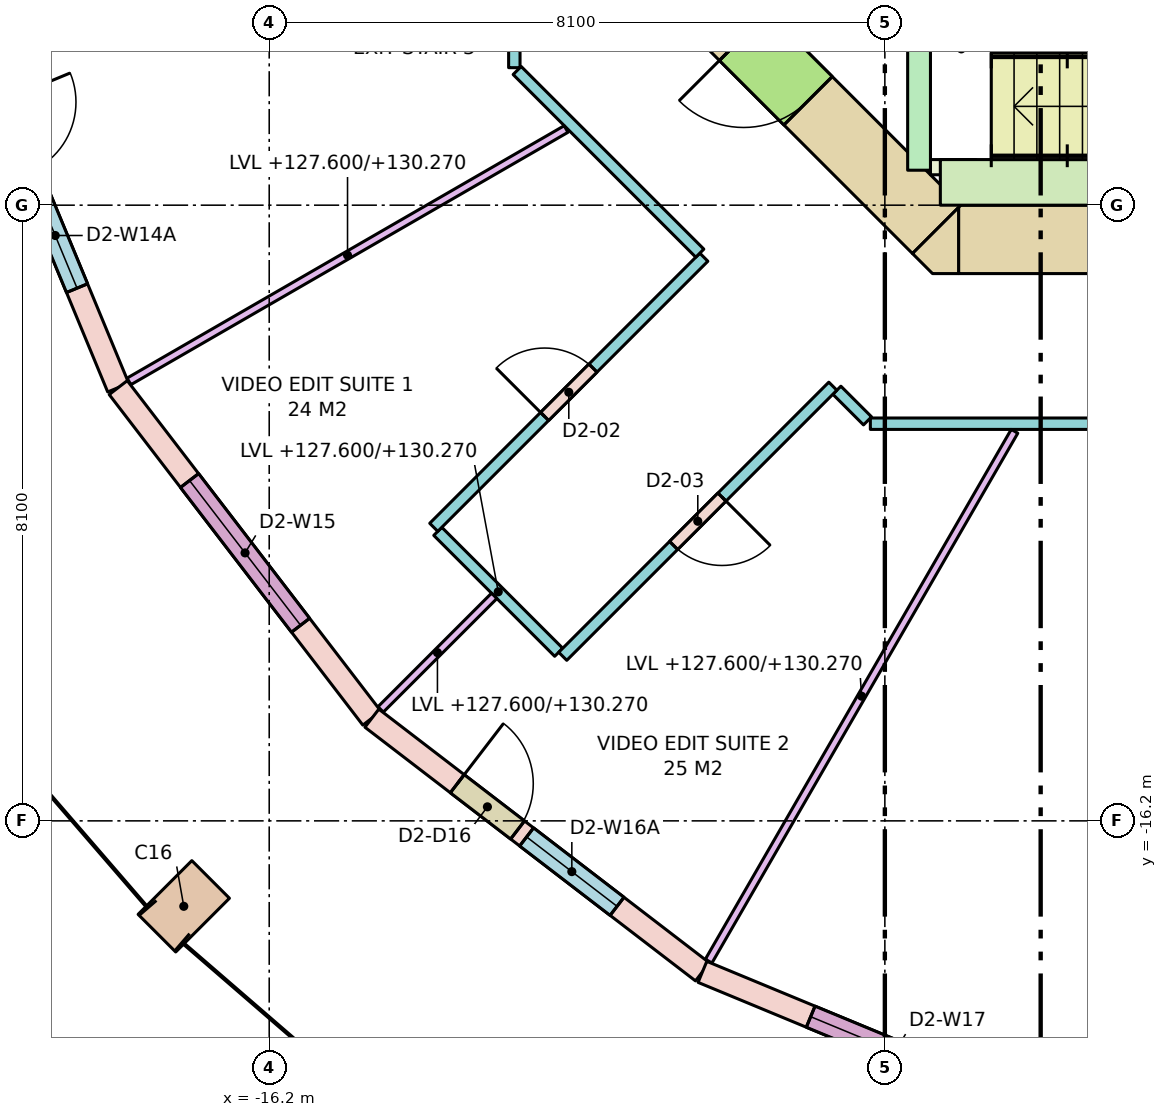
"""IFC4 building model, lengths in metres.
Left out: names, types, materials, properties, quantities, classifications, styles, units other than length and angle.
Written with IfcOpenShell. Run it as: python <this file> out.ifc"""

import sys

from ifc_helpers import new_model, si_unit, direction, frame, frame_2d, origin, origin_2d, place, context, subcontext, project, spatial, polyline, rectangle, outline, extrude, element, fill, save


model = new_model("IFC4")
c1 = context("Model", 3, precision=1e-05, world=origin(), true_north=direction((0.0, 1.0)))
c2 = subcontext(c1, "Body", "Model", "MODEL_VIEW")
j1 = project(units=[si_unit("LENGTHUNIT", "METRE"), si_unit("PLANEANGLEUNIT", "RADIAN")], contexts=[c1])
p1 = place(None, origin())
s1 = spatial("IfcSite", under=j1, at=p1, CompositionType="ELEMENT")
p2 = place(p1, origin())
s2 = spatial("IfcBuilding", under=s1, at=p2, CompositionType="ELEMENT")
p3 = place(p2, frame((0.0, 0.0, 127.6)))
s3 = spatial("IfcBuildingStorey", under=s2, at=p3, CompositionType="ELEMENT", Elevation=127.6)
p4 = place(p3, frame((-17.324, -17.324, 0.0), z_axis=(0.0, 0.0, 1.0), x_axis=(0.707106781187, -0.707106781187, 0.0)))
e1 = element("IfcColumn", 1, at=p4, inside=s3, PredefinedType="COLUMN", context=c2, shape_type="SweptSolid", body=[
    extrude(rectangle(XDim=0.7, YDim=1.0, at=origin_2d()), origin(), (0.0, 0.0, 1.0), 3.8),
])
p5 = place(p3, frame((-7.13, -8.55, -0.28), z_axis=(0.0, 0.0, 1.0), x_axis=(1.0, 0.0, 0.0)))
e2 = element("IfcWall", 2, at=p5, inside=s3, PredefinedType="SHEAR", context=c2, shape_type="SweptSolid", body=[
    extrude(rectangle(XDim=14.26, YDim=0.9, at=frame_2d((7.13, 0.0))), origin(), (0.0, 0.0, 1.0), 3.8),
])
p6 = place(p5, frame((8.08, 0.0, 0.28)))
e3 = element("IfcOpeningElement", 3, at=p6, cuts=e2, PredefinedType="OPENING", context=c2, shape_type="SweptSolid", body=[
    extrude(rectangle(XDim=0.7, YDim=2.1, at=frame_2d((0.35, 1.05))), frame((0.0, 0.46, 0.0), z_axis=(0.0, -1.0, 0.0), x_axis=(1.0, 0.0, 0.0)), (0.0, 0.0, 1.0), 0.92),
])
p7 = place(p5, frame((6.205, 0.0, 0.28)))
e4 = element("IfcOpeningElement", 4, at=p7, cuts=e2, PredefinedType="OPENING", context=c2, shape_type="SweptSolid", body=[
    extrude(rectangle(XDim=0.9, YDim=2.1, at=frame_2d((0.45, 1.05))), frame((0.0, 0.46, 0.0), z_axis=(0.0, -1.0, 0.0), x_axis=(1.0, 0.0, 0.0)), (0.0, 0.0, 1.0), 0.92),
])
p8 = place(p5, frame((10.667, 0.0, 0.28)))
e5 = element("IfcOpeningElement", 5, at=p8, cuts=e2, PredefinedType="OPENING", context=c2, shape_type="SweptSolid", body=[
    extrude(rectangle(XDim=0.9, YDim=2.1, at=frame_2d((0.45, 1.05))), frame((0.0, 0.46, 0.0), z_axis=(0.0, -1.0, 0.0), x_axis=(1.0, 0.0, 0.0)), (0.0, 0.0, 1.0), 0.92),
])
p9 = place(p3, frame((-7.418, -8.418, -0.28), z_axis=(0.0, 0.0, 1.0), x_axis=(-0.707106781187, 0.707106781187, 0.0)))
e6 = element("IfcWall", 6, at=p9, inside=s3, PredefinedType="SHEAR", context=c2, shape_type="SweptSolid", body=[
    extrude(rectangle(XDim=4.243, YDim=0.9, at=frame_2d((2.121, 0.0))), origin(), (0.0, 0.0, 1.0), 3.8),
])
p10 = place(p9, frame((2.393, 0.0, 0.28)))
e7 = element("IfcOpeningElement", 7, at=p10, cuts=e6, PredefinedType="OPENING", context=c2, shape_type="SweptSolid", body=[
    extrude(rectangle(XDim=1.2, YDim=2.1, at=frame_2d((0.6, 1.05))), frame((0.0, 0.46, 0.0), z_axis=(0.0, -1.0, 0.0), x_axis=(1.0, 0.0, 0.0)), (0.0, 0.0, 1.0), 0.92),
])
p11 = place(p3, frame((0.0, 0.0, -0.28)))
e8 = element("IfcWall", 8, at=p11, inside=s3, PredefinedType="SHEAR", context=c2, shape_type="SweptSolid", body=[
    extrude(outline(polyline([(-7.473, -9.0), (-7.736, -8.736), (-7.13, -8.13), (-7.13, -9.0), (-7.473, -9.0)])), origin(), (0.0, 0.0, 1.0), 3.8),
])
p12 = place(p3, frame((-7.65, -7.64, 0.0), z_axis=(0.0, 0.0, 1.0), x_axis=(0.0, 1.0, 0.0)))
e9 = element("IfcWall", 9, at=p12, inside=s3, PredefinedType="SHEAR", context=c2, shape_type="SweptSolid", body=[
    extrude(rectangle(XDim=3.14, YDim=0.3, at=frame_2d((1.57, 0.0))), origin(), (0.0, 0.0, 1.0), 3.52),
])
p13 = place(p12, frame((1.68, 0.0, 0.0)))
e10 = element("IfcOpeningElement", 10, at=p13, cuts=e9, PredefinedType="OPENING", context=c2, shape_type="SweptSolid", body=[
    extrude(rectangle(XDim=1.32, YDim=2.1, at=frame_2d((0.66, 1.05))), frame((0.0, 0.16, 0.0), z_axis=(0.0, -1.0, 0.0), x_axis=(1.0, 0.0, 0.0)), (0.0, 0.0, 1.0), 0.32),
])
p14 = place(p3, frame((-7.5, -7.6, 0.0), z_axis=(0.0, 0.0, 1.0), x_axis=(1.0, 0.0, 0.0)))
e11 = element("IfcWall", 11, at=p14, inside=s3, PredefinedType="SHEAR", context=c2, shape_type="SweptSolid", body=[
    extrude(rectangle(XDim=0.6, YDim=0.2, at=frame_2d((0.3, 0.0))), origin(), (0.0, 0.0, 1.0), 3.52),
])
p15 = place(p3, frame((-7.37, -7.8, 0.0), z_axis=(0.0, 0.0, 1.0), x_axis=(1.0, 0.0, 0.0)))
e12 = element("IfcWall", 12, at=p15, inside=s3, PredefinedType="SHEAR", context=c2, shape_type="SweptSolid", body=[
    extrude(rectangle(XDim=5.37, YDim=0.6, at=frame_2d((2.685, 0.0))), origin(), (0.0, 0.0, 1.0), 3.52),
])
p16 = place(p3, frame((-20.284, -5.435, 0.0), z_axis=(0.0, 0.0, 1.0), x_axis=(0.382688740813, -0.923877333662, 0.0)))
e13 = element("IfcWall", 13, at=p16, inside=s3, PredefinedType="STANDARD", context=c2, shape_type="SweptSolid", body=[
    extrude(rectangle(XDim=5.482, YDim=0.3, at=frame_2d((2.741, 0.0))), origin(), (0.0, 0.0, 1.0), 3.52),
])
p17 = place(p16, frame((1.416, 0.0, 0.0)))
e14 = element("IfcOpeningElement", 14, at=p17, cuts=e13, PredefinedType="OPENING", context=c2, shape_type="SweptSolid", body=[
    extrude(rectangle(XDim=1.0, YDim=2.4, at=frame_2d((0.5, 1.2))), frame((0.0, 0.16, 0.0), z_axis=(0.0, -1.0, 0.0), x_axis=(1.0, 0.0, 0.0)), (0.0, 0.0, 1.0), 0.32),
])
p18 = place(p16, frame((2.566, 0.0, 0.8)))
e15 = element("IfcOpeningElement", 15, at=p18, cuts=e13, PredefinedType="OPENING", context=c2, shape_type="SweptSolid", body=[
    extrude(rectangle(XDim=1.5, YDim=2.5, at=frame_2d((0.75, 1.25))), frame((0.0, 0.16, 0.0), z_axis=(0.0, -1.0, 0.0), x_axis=(1.0, 0.0, 0.0)), (0.0, 0.0, 1.0), 0.32),
])
p19 = place(p3, frame((-18.187, -10.5, 0.0), z_axis=(0.0, 0.0, 1.0), x_axis=(0.608784891166, -0.793335336593, 0.0)))
e16 = element("IfcWall", 16, at=p19, inside=s3, PredefinedType="STANDARD", context=c2, shape_type="SweptSolid", body=[
    extrude(rectangle(XDim=5.482, YDim=0.3, at=frame_2d((2.741, 0.0))), origin(), (0.0, 0.0, 1.0), 3.52),
])
p20 = place(p19, frame((1.541, 0.0, 0.8)))
e17 = element("IfcOpeningElement", 17, at=p20, cuts=e16, PredefinedType="OPENING", context=c2, shape_type="SweptSolid", body=[
    extrude(rectangle(XDim=2.4, YDim=2.5, at=frame_2d((1.2, 1.25))), frame((0.0, 0.16, 0.0), z_axis=(0.0, -1.0, 0.0), x_axis=(1.0, 0.0, 0.0)), (0.0, 0.0, 1.0), 0.32),
])
p21 = place(p3, frame((-14.849, -14.849, 0.0), z_axis=(0.0, 0.0, 1.0), x_axis=(0.793335336593, -0.608784891166, 0.0)))
e18 = element("IfcWall", 18, at=p21, inside=s3, PredefinedType="STANDARD", context=c2, shape_type="SweptSolid", body=[
    extrude(rectangle(XDim=5.482, YDim=0.3, at=frame_2d((2.741, 0.0))), origin(), (0.0, 0.0, 1.0), 3.52),
])
p22 = place(p21, frame((1.416, 0.0, 0.0)))
e19 = element("IfcOpeningElement", 19, at=p22, cuts=e18, PredefinedType="OPENING", context=c2, shape_type="SweptSolid", body=[
    extrude(rectangle(XDim=1.0, YDim=2.4, at=frame_2d((0.5, 1.2))), frame((0.0, 0.16, 0.0), z_axis=(0.0, -1.0, 0.0), x_axis=(1.0, 0.0, 0.0)), (0.0, 0.0, 1.0), 0.32),
])
p23 = place(p21, frame((2.566, 0.0, 0.8)))
e20 = element("IfcOpeningElement", 20, at=p23, cuts=e18, PredefinedType="OPENING", context=c2, shape_type="SweptSolid", body=[
    extrude(rectangle(XDim=1.5, YDim=2.5, at=frame_2d((0.75, 1.25))), frame((0.0, 0.16, 0.0), z_axis=(0.0, -1.0, 0.0), x_axis=(1.0, 0.0, 0.0)), (0.0, 0.0, 1.0), 0.32),
])
p24 = place(p3, frame((-10.5, -18.187, 0.0), z_axis=(0.0, 0.0, 1.0), x_axis=(0.923877333662, -0.382688740813, 0.0)))
e21 = element("IfcWall", 21, at=p24, inside=s3, PredefinedType="STANDARD", context=c2, shape_type="SweptSolid", body=[
    extrude(rectangle(XDim=5.482, YDim=0.3, at=frame_2d((2.741, 0.0))), origin(), (0.0, 0.0, 1.0), 3.52),
])
p25 = place(p24, frame((1.541, 0.0, 0.8)))
e22 = element("IfcOpeningElement", 22, at=p25, cuts=e21, PredefinedType="OPENING", context=c2, shape_type="SweptSolid", body=[
    extrude(rectangle(XDim=2.4, YDim=2.5, at=frame_2d((1.2, 1.25))), frame((0.0, 0.16, 0.0), z_axis=(0.0, -1.0, 0.0), x_axis=(1.0, 0.0, 0.0)), (0.0, 0.0, 1.0), 0.32),
])
p26 = place(p3, frame((-12.391, -13.982, 0.0), z_axis=(0.0, 0.0, 1.0), x_axis=(-0.707106781187, 0.707106781187, 0.0)))
e23 = element("IfcWall", 23, at=p26, inside=s3, PredefinedType="PARTITIONING", context=c2, shape_type="SweptSolid", body=[
    extrude(rectangle(XDim=2.25, YDim=0.15, at=frame_2d((1.125, 0.0))), origin(), (0.0, 0.0, 1.0), 2.67),
])
p27 = place(p3, frame((-14.035, -12.338, 0.0), z_axis=(0.0, 0.0, 1.0), x_axis=(0.707106781187, 0.707106781187, 0.0)))
e24 = element("IfcWall", 24, at=p27, inside=s3, PredefinedType="PARTITIONING", context=c2, shape_type="SweptSolid", body=[
    extrude(rectangle(XDim=5.026, YDim=0.15, at=frame_2d((2.513, 0.0))), origin(), (0.0, 0.0, 1.0), 3.52),
])
p28 = place(p27, frame((2.063, 0.0, 0.0)))
e25 = element("IfcOpeningElement", 25, at=p28, cuts=e24, PredefinedType="OPENING", context=c2, shape_type="SweptSolid", body=[
    extrude(rectangle(XDim=0.9, YDim=2.1, at=frame_2d((0.45, 1.05))), frame((0.0, 0.085, 0.0), z_axis=(0.0, -1.0, 0.0), x_axis=(1.0, 0.0, 0.0)), (0.0, 0.0, 1.0), 0.17),
])
p29 = place(p3, frame((-10.534, -8.731, 0.0), z_axis=(0.0, 0.0, 1.0), x_axis=(-0.707106781187, 0.707106781187, 0.0)))
e26 = element("IfcWall", 26, at=p29, inside=s3, PredefinedType="PARTITIONING", context=c2, shape_type="SweptSolid", body=[
    extrude(rectangle(XDim=3.399, YDim=0.15, at=frame_2d((1.7, 0.0))), origin(), (0.0, 0.0, 1.0), 2.67),
])
p30 = place(p3, frame((-12.975, -6.291, 0.0), z_axis=(0.0, 0.0, 1.0), x_axis=(0.0, 1.0, 0.0)))
e27 = element("IfcWall", 27, at=p30, inside=s3, PredefinedType="PARTITIONING", context=c2, shape_type="SweptSolid", body=[
    extrude(rectangle(XDim=12.582, YDim=0.15, at=frame_2d((6.291, 0.0))), origin(), (0.0, 0.0, 1.0), 2.67),
])
p31 = place(p30, frame((5.391, 0.0, 0.0)))
e28 = element("IfcOpeningElement", 28, at=p31, cuts=e27, PredefinedType="OPENING", context=c2, shape_type="SweptSolid", body=[
    extrude(rectangle(XDim=1.8, YDim=2.1, at=frame_2d((0.9, 1.05))), frame((0.0, 0.085, 0.0), z_axis=(0.0, -1.0, 0.0), x_axis=(1.0, 0.0, 0.0)), (0.0, 0.0, 1.0), 0.17),
])
p32 = place(p3, frame((-1.275, -10.975, 0.0), z_axis=(0.0, 0.0, 1.0), x_axis=(-1.0, 0.0, 0.0)))
e29 = element("IfcWall", 29, at=p32, inside=s3, PredefinedType="PARTITIONING", context=c2, shape_type="SweptSolid", body=[
    extrude(rectangle(XDim=7.016, YDim=0.15, at=frame_2d((3.508, 0.0))), origin(), (0.0, 0.0, 1.0), 2.67),
])
p33 = place(p3, frame((-8.328, -10.938, 0.0), z_axis=(0.0, 0.0, 1.0), x_axis=(-0.707106781187, 0.707106781187, 0.0)))
e30 = element("IfcWall", 30, at=p33, inside=s3, PredefinedType="PARTITIONING", context=c2, shape_type="SweptSolid", body=[
    extrude(rectangle(XDim=0.571, YDim=0.15, at=frame_2d((0.285, 0.0))), origin(), (0.0, 0.0, 1.0), 3.52),
])
p34 = place(p3, frame((-8.784, -10.481, 0.0), z_axis=(0.0, 0.0, 1.0), x_axis=(-0.707106781187, -0.707106781187, 0.0)))
e31 = element("IfcWall", 31, at=p34, inside=s3, PredefinedType="PARTITIONING", context=c2, shape_type="SweptSolid", body=[
    extrude(rectangle(XDim=5.026, YDim=0.15, at=frame_2d((2.513, 0.0))), origin(), (0.0, 0.0, 1.0), 3.52),
])
p35 = place(p34, frame((2.063, 0.0, 0.0)))
e32 = element("IfcOpeningElement", 32, at=p35, cuts=e31, PredefinedType="OPENING", context=c2, shape_type="SweptSolid", body=[
    extrude(rectangle(XDim=0.9, YDim=2.1, at=frame_2d((0.45, 1.05))), frame((0.0, 0.085, 0.0), z_axis=(0.0, -1.0, 0.0), x_axis=(1.0, 0.0, 0.0)), (0.0, 0.0, 1.0), 0.17),
])
p36 = place(p3, frame((-12.294, -7.098, 0.0), z_axis=(0.0, 0.0, 1.0), x_axis=(-0.866010486135, -0.500025837236, 0.0)))
e33 = element("IfcWall", 33, at=p36, inside=s3, PredefinedType="PARTITIONING", context=c2, shape_type="SweptSolid", body=[
    extrude(rectangle(XDim=6.641, YDim=0.1, at=frame_2d((3.32, 0.0))), origin(), (0.0, 0.0, 1.0), 2.67),
])
p37 = place(p3, frame((-13.24, -13.24, 0.0), z_axis=(0.0, 0.0, 1.0), x_axis=(-0.707106781187, -0.707106781187, 0.0)))
e34 = element("IfcWall", 34, at=p37, inside=s3, PredefinedType="PARTITIONING", context=c2, shape_type="SweptSolid", body=[
    extrude(rectangle(XDim=2.113, YDim=0.1, at=frame_2d((1.057, 0.0))), origin(), (0.0, 0.0, 1.0), 2.67),
])
p38 = place(p3, frame((-6.394, -11.075, 0.0), z_axis=(0.0, 0.0, 1.0), x_axis=(-0.500024397361, -0.866011317503, 0.0)))
e35 = element("IfcWall", 35, at=p38, inside=s3, PredefinedType="PARTITIONING", context=c2, shape_type="SweptSolid", body=[
    extrude(rectangle(XDim=8.049, YDim=0.1, at=frame_2d((4.024, 0.0))), origin(), (0.0, 0.0, 1.0), 2.67),
])
p39 = place(p18, origin())
e36 = element("IfcWindow", 36, at=p39, inside=s3, PartitioningType="SINGLE_PANEL", PredefinedType="WINDOW", context=c2, shape_type="SweptSolid", body=[
    extrude(rectangle(XDim=1.5, YDim=2.5, at=frame_2d((0.75, 1.25))), frame((0.0, 0.03, 0.0), z_axis=(0.0, -1.0, 0.0), x_axis=(1.0, 0.0, 0.0)), (0.0, 0.0, 1.0), 0.06),
])
fill(e15, e36)
p40 = place(p20, origin())
e37 = element("IfcWindow", 37, at=p40, inside=s3, PartitioningType="SINGLE_PANEL", PredefinedType="WINDOW", context=c2, shape_type="SweptSolid", body=[
    extrude(rectangle(XDim=2.4, YDim=2.5, at=frame_2d((1.2, 1.25))), frame((0.0, 0.03, 0.0), z_axis=(0.0, -1.0, 0.0), x_axis=(1.0, 0.0, 0.0)), (0.0, 0.0, 1.0), 0.06),
])
fill(e17, e37)
p41 = place(p22, origin())
e38 = element("IfcDoor", 38, at=p41, inside=s3, OperationType="SINGLE_SWING_LEFT", PredefinedType="DOOR", context=c2, shape_type="SweptSolid", body=[
    extrude(rectangle(XDim=1.0, YDim=2.4, at=frame_2d((0.5, 1.2))), frame((0.0, 0.025, 0.0), z_axis=(0.0, -1.0, 0.0), x_axis=(1.0, 0.0, 0.0)), (0.0, 0.0, 1.0), 0.05),
])
fill(e19, e38)
p42 = place(p23, origin())
e39 = element("IfcWindow", 39, at=p42, inside=s3, PartitioningType="SINGLE_PANEL", PredefinedType="WINDOW", context=c2, shape_type="SweptSolid", body=[
    extrude(rectangle(XDim=1.5, YDim=2.5, at=frame_2d((0.75, 1.25))), frame((0.0, 0.03, 0.0), z_axis=(0.0, -1.0, 0.0), x_axis=(1.0, 0.0, 0.0)), (0.0, 0.0, 1.0), 0.06),
])
fill(e20, e39)
p43 = place(p25, origin())
e40 = element("IfcWindow", 40, at=p43, inside=s3, PartitioningType="SINGLE_PANEL", PredefinedType="WINDOW", context=c2, shape_type="SweptSolid", body=[
    extrude(rectangle(XDim=2.4, YDim=2.5, at=frame_2d((1.2, 1.25))), frame((0.0, 0.03, 0.0), z_axis=(0.0, -1.0, 0.0), x_axis=(1.0, 0.0, 0.0)), (0.0, 0.0, 1.0), 0.06),
])
fill(e22, e40)
p44 = place(p10, origin())
e41 = element("IfcDoor", 41, at=p44, inside=s3, OperationType="SINGLE_SWING_RIGHT", PredefinedType="DOOR", context=c2, shape_type="SweptSolid", body=[
    extrude(rectangle(XDim=1.2, YDim=2.1, at=frame_2d((0.6, 1.05))), frame((0.0, 0.025, 0.0), z_axis=(0.0, -1.0, 0.0), x_axis=(1.0, 0.0, 0.0)), (0.0, 0.0, 1.0), 0.05),
])
fill(e7, e41)
p45 = place(p28, origin())
e42 = element("IfcDoor", 42, at=p45, inside=s3, OperationType="SINGLE_SWING_LEFT", PredefinedType="DOOR", context=c2, shape_type="SweptSolid", body=[
    extrude(rectangle(XDim=0.9, YDim=2.1, at=frame_2d((0.45, 1.05))), frame((0.0, 0.025, 0.0), z_axis=(0.0, -1.0, 0.0), x_axis=(1.0, 0.0, 0.0)), (0.0, 0.0, 1.0), 0.05),
])
fill(e25, e42)
p46 = place(p35, origin())
e43 = element("IfcDoor", 43, at=p46, inside=s3, OperationType="SINGLE_SWING_LEFT", PredefinedType="DOOR", context=c2, shape_type="SweptSolid", body=[
    extrude(rectangle(XDim=0.9, YDim=2.1, at=frame_2d((0.45, 1.05))), frame((0.0, 0.025, 0.0), z_axis=(0.0, -1.0, 0.0), x_axis=(1.0, 0.0, 0.0)), (0.0, 0.0, 1.0), 0.05),
])
fill(e32, e43)
save(model, sys.argv[1])
